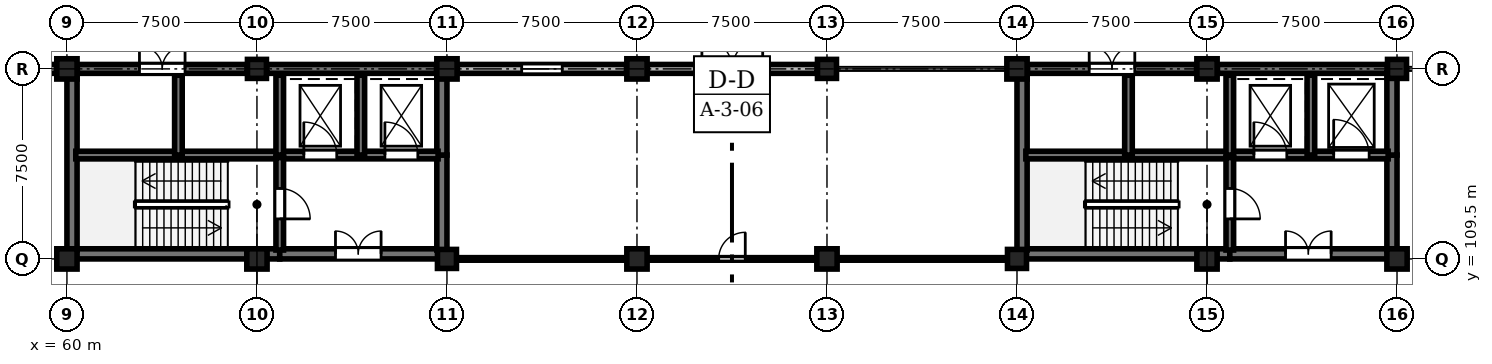
"""IFC4 building model, lengths in metres.
Left out: names, types, materials, properties, quantities, classifications, styles, units other than length and angle.
Written with IfcOpenShell. Run it as: python <this file> out.ifc"""

import sys

from ifc_helpers import new_model, si_unit, direction, frame, frame_2d, origin, origin_2d, place, context, subcontext, project, spatial, rectangle, circle, extrude, element, fill, save


model = new_model("IFC4")
c1 = context("Model", 3, precision=1e-05, world=origin(), true_north=direction((0.0, 1.0)))
c2 = subcontext(c1, "Body", "Model", "MODEL_VIEW")
j1 = project(units=[si_unit("LENGTHUNIT", "METRE"), si_unit("PLANEANGLEUNIT", "RADIAN")], contexts=[c1])
p1 = place(None, origin())
s1 = spatial("IfcSite", under=j1, at=p1, CompositionType="ELEMENT")
p2 = place(p1, origin())
s2 = spatial("IfcBuilding", under=s1, at=p2, CompositionType="ELEMENT")
p3 = place(p2, origin())
s3 = spatial("IfcBuildingStorey", under=s2, at=p3, CompositionType="ELEMENT", Elevation=0.0)
for number, where, z_axis, x_axis in (
    (1, (60.0, 109.5, 0.0), (0.0, 0.0, 1.0), (1.0, 0.0, 0.0)),
    (2, (60.0, 117.0, 0.0), (0.0, 0.0, 1.0), (1.0, 0.0, 0.0)),
    (3, (67.5, 109.5, 0.0), (0.0, 0.0, 1.0), (1.0, 0.0, 0.0)),
):
    element("IfcColumn", number, at=place(p3, frame(where, z_axis=z_axis, x_axis=x_axis)), inside=s3, PredefinedType="COLUMN", context=c2, shape_type="SweptSolid", body=[
        extrude(rectangle(XDim=0.8, YDim=0.8, at=origin_2d()), origin(), (0.0, 0.0, 1.0), 4.8),
    ])
for number, where, z_axis, x_axis in (
    (4, (67.5, 117.0, 0.0), (0.0, 0.0, 1.0), (1.0, 0.0, 0.0)),
    (5, (75.0, 109.5, 0.0), (0.0, 0.0, 1.0), (1.0, 0.0, 0.0)),
):
    element("IfcColumn", number, at=place(p3, frame(where, z_axis=z_axis, x_axis=x_axis)), inside=s3, PredefinedType="COLUMN", context=c2, shape_type="SweptSolid", body=[
        extrude(circle(Radius=0.375, at=origin_2d()), origin(), (0.0, 0.0, 1.0), 4.8),
    ])
for number, where, z_axis, x_axis in (
    (6, (75.0, 117.0, 0.0), (0.0, 0.0, 1.0), (1.0, 0.0, 0.0)),
    (7, (82.5, 109.5, 0.0), (0.0, 0.0, 1.0), (1.0, 0.0, 0.0)),
    (8, (82.5, 117.0, 0.0), (0.0, 0.0, 1.0), (1.0, 0.0, 0.0)),
    (9, (90.0, 109.5, 0.0), (0.0, 0.0, 1.0), (1.0, 0.0, 0.0)),
):
    element("IfcColumn", number, at=place(p3, frame(where, z_axis=z_axis, x_axis=x_axis)), inside=s3, PredefinedType="COLUMN", context=c2, shape_type="SweptSolid", body=[
        extrude(rectangle(XDim=0.8, YDim=0.8, at=origin_2d()), origin(), (0.0, 0.0, 1.0), 4.8),
    ])
for number, where, z_axis, x_axis in (
    (10, (90.0, 117.0, 0.0), (0.0, 0.0, 1.0), (1.0, 0.0, 0.0)),
    (11, (97.5, 109.5, 0.0), (0.0, 0.0, 1.0), (1.0, 0.0, 0.0)),
):
    element("IfcColumn", number, at=place(p3, frame(where, z_axis=z_axis, x_axis=x_axis)), inside=s3, PredefinedType="COLUMN", context=c2, shape_type="SweptSolid", body=[
        extrude(circle(Radius=0.375, at=origin_2d()), origin(), (0.0, 0.0, 1.0), 4.8),
    ])
for number, where, z_axis, x_axis in (
    (12, (97.5, 117.0, 0.0), (0.0, 0.0, 1.0), (1.0, 0.0, 0.0)),
    (13, (105.0, 109.5, 0.0), (0.0, 0.0, 1.0), (1.0, 0.0, 0.0)),
    (14, (105.0, 117.0, 0.0), (0.0, 0.0, 1.0), (1.0, 0.0, 0.0)),
    (15, (112.5, 109.5, 0.0), (0.0, 0.0, 1.0), (1.0, 0.0, 0.0)),
):
    element("IfcColumn", number, at=place(p3, frame(where, z_axis=z_axis, x_axis=x_axis)), inside=s3, PredefinedType="COLUMN", context=c2, shape_type="SweptSolid", body=[
        extrude(rectangle(XDim=0.8, YDim=0.8, at=origin_2d()), origin(), (0.0, 0.0, 1.0), 4.8),
    ])
p4 = place(p3, frame((112.5, 117.0, 0.0), z_axis=(0.0, 0.0, 1.0), x_axis=(1.0, 0.0, 0.0)))
e16 = element("IfcColumn", 16, at=p4, inside=s3, PredefinedType="COLUMN", context=c2, shape_type="SweptSolid", body=[
    extrude(circle(Radius=0.375, at=origin_2d()), origin(), (0.0, 0.0, 1.0), 4.8),
])
p5 = place(p3, frame((52.885, 117.0, 0.0), z_axis=(0.0, 0.0, 1.0), x_axis=(1.0, 0.0, 0.0)))
e17 = element("IfcWall", 17, at=p5, inside=s3, PredefinedType="STANDARD", context=c2, shape_type="SweptSolid", body=[
    extrude(rectangle(XDim=6.705, YDim=0.35, at=frame_2d((3.353, 0.0))), origin(), (0.0, 0.0, 1.0), 3.95),
])
p6 = place(p5, frame((2.752, 0.0, 0.9)))
e18 = element("IfcOpeningElement", 18, at=p6, cuts=e17, PredefinedType="OPENING", context=c2, shape_type="SweptSolid", body=[
    extrude(rectangle(XDim=1.2, YDim=2.1, at=frame_2d((0.6, 1.05))), frame((0.0, 0.185, 0.0), z_axis=(0.0, -1.0, 0.0), x_axis=(1.0, 0.0, 0.0)), (0.0, 0.0, 1.0), 0.37),
])
p7 = place(p3, frame((60.41, 117.0, 0.0), z_axis=(0.0, 0.0, 1.0), x_axis=(1.0, 0.0, 0.0)))
e19 = element("IfcWall", 19, at=p7, inside=s3, PredefinedType="SHEAR", context=c2, shape_type="SweptSolid", body=[
    extrude(rectangle(XDim=6.705, YDim=0.35, at=frame_2d((3.353, 0.0))), origin(), (0.0, 0.0, 1.0), 4.5),
])
p8 = place(p7, frame((2.452, 0.0, 0.0)))
e20 = element("IfcOpeningElement", 20, at=p8, cuts=e19, PredefinedType="OPENING", context=c2, shape_type="SweptSolid", body=[
    extrude(rectangle(XDim=1.8, YDim=2.5, at=frame_2d((0.9, 1.25))), frame((0.0, 0.185, 0.0), z_axis=(0.0, -1.0, 0.0), x_axis=(1.0, 0.0, 0.0)), (0.0, 0.0, 1.0), 0.37),
])
p9 = place(p3, frame((67.885, 117.0, 0.0), z_axis=(0.0, 0.0, 1.0), x_axis=(1.0, 0.0, 0.0)))
e21 = element("IfcWall", 21, at=p9, inside=s3, PredefinedType="SHEAR", context=c2, shape_type="SweptSolid", body=[
    extrude(rectangle(XDim=6.705, YDim=0.35, at=frame_2d((3.353, 0.0))), origin(), (0.0, 0.0, 1.0), 4.5),
])
p10 = place(p3, frame((75.41, 117.0, 0.0), z_axis=(0.0, 0.0, 1.0), x_axis=(1.0, 0.0, 0.0)))
e22 = element("IfcWall", 22, at=p10, inside=s3, PredefinedType="STANDARD", context=c2, shape_type="SweptSolid", body=[
    extrude(rectangle(XDim=6.68, YDim=0.35, at=frame_2d((3.34, 0.0))), origin(), (0.0, 0.0, 1.0), 3.95),
])
p11 = place(p10, frame((2.54, 0.0, 0.9)))
e23 = element("IfcOpeningElement", 23, at=p11, cuts=e22, PredefinedType="OPENING", context=c2, shape_type="SweptSolid", body=[
    extrude(rectangle(XDim=1.6, YDim=1.95, at=frame_2d((0.8, 0.975))), frame((0.0, 0.185, 0.0), z_axis=(0.0, -1.0, 0.0), x_axis=(1.0, 0.0, 0.0)), (0.0, 0.0, 1.0), 0.37),
])
p12 = place(p3, frame((82.91, 117.0, 0.0), z_axis=(0.0, 0.0, 1.0), x_axis=(1.0, 0.0, 0.0)))
e24 = element("IfcWall", 24, at=p12, inside=s3, PredefinedType="STANDARD", context=c2, shape_type="SweptSolid", body=[
    extrude(rectangle(XDim=6.705, YDim=0.35, at=frame_2d((3.353, 0.0))), origin(), (0.0, 0.0, 1.0), 3.95),
])
p13 = place(p12, frame((2.153, 0.0, 0.0)))
e25 = element("IfcOpeningElement", 25, at=p13, cuts=e24, PredefinedType="OPENING", context=c2, shape_type="SweptSolid", body=[
    extrude(rectangle(XDim=2.4, YDim=2.7, at=frame_2d((1.2, 1.35))), frame((0.0, 0.185, 0.0), z_axis=(0.0, -1.0, 0.0), x_axis=(1.0, 0.0, 0.0)), (0.0, 0.0, 1.0), 0.37),
])
p14 = place(p3, frame((97.91, 117.0, 0.0), z_axis=(0.0, 0.0, 1.0), x_axis=(1.0, 0.0, 0.0)))
e26 = element("IfcWall", 26, at=p14, inside=s3, PredefinedType="SHEAR", context=c2, shape_type="SweptSolid", body=[
    extrude(rectangle(XDim=6.68, YDim=0.35, at=frame_2d((3.34, 0.0))), origin(), (0.0, 0.0, 1.0), 4.5),
])
p15 = place(p14, frame((2.44, 0.0, 0.0)))
e27 = element("IfcOpeningElement", 27, at=p15, cuts=e26, PredefinedType="OPENING", context=c2, shape_type="SweptSolid", body=[
    extrude(rectangle(XDim=1.8, YDim=2.5, at=frame_2d((0.9, 1.25))), frame((0.0, 0.185, 0.0), z_axis=(0.0, -1.0, 0.0), x_axis=(1.0, 0.0, 0.0)), (0.0, 0.0, 1.0), 0.37),
])
p16 = place(p3, frame((105.41, 117.0, 0.0), z_axis=(0.0, 0.0, 1.0), x_axis=(1.0, 0.0, 0.0)))
e28 = element("IfcWall", 28, at=p16, inside=s3, PredefinedType="SHEAR", context=c2, shape_type="SweptSolid", body=[
    extrude(rectangle(XDim=6.705, YDim=0.35, at=frame_2d((3.353, 0.0))), origin(), (0.0, 0.0, 1.0), 4.5),
])
p17 = place(p3, frame((60.35, 109.7, 0.0), z_axis=(0.0, 0.0, 1.0), x_axis=(1.0, 0.0, 0.0)))
e29 = element("IfcWall", 29, at=p17, inside=s3, PredefinedType="SHEAR", context=c2, shape_type="SweptSolid", body=[
    extrude(rectangle(XDim=8.05, YDim=0.4, at=frame_2d((4.025, 0.0))), origin(), (0.0, 0.0, 1.0), 4.5),
])
p18 = place(p3, frame((68.4, 109.7, 0.0), z_axis=(0.0, 0.0, 1.0), x_axis=(1.0, 0.0, 0.0)))
e30 = element("IfcWall", 30, at=p18, inside=s3, PredefinedType="SHEAR", context=c2, shape_type="SweptSolid", body=[
    extrude(rectangle(XDim=6.25, YDim=0.4, at=frame_2d((3.125, 0.0))), origin(), (0.0, 0.0, 1.0), 4.5),
])
p19 = place(p18, frame((2.2, 0.0, 0.0)))
e31 = element("IfcOpeningElement", 31, at=p19, cuts=e30, PredefinedType="OPENING", context=c2, shape_type="SweptSolid", body=[
    extrude(rectangle(XDim=1.8, YDim=2.25, at=frame_2d((0.9, 1.125))), frame((0.0, 0.21, 0.0), z_axis=(0.0, -1.0, 0.0), x_axis=(1.0, 0.0, 0.0)), (0.0, 0.0, 1.0), 0.42),
])
p20 = place(p3, frame((60.2, 109.85, 0.0), z_axis=(0.0, 0.0, 1.0), x_axis=(0.0, 1.0, 0.0)))
e32 = element("IfcWall", 32, at=p20, inside=s3, PredefinedType="SHEAR", context=c2, shape_type="SweptSolid", body=[
    extrude(rectangle(XDim=6.8, YDim=0.4, at=frame_2d((3.4, 0.0))), origin(), (0.0, 0.0, 1.0), 4.5),
])
p21 = place(p3, frame((74.8, 109.85, 0.0), z_axis=(0.0, 0.0, 1.0), x_axis=(0.0, 1.0, 0.0)))
e33 = element("IfcWall", 33, at=p21, inside=s3, PredefinedType="SHEAR", context=c2, shape_type="SweptSolid", body=[
    extrude(rectangle(XDim=3.75, YDim=0.4, at=frame_2d((1.875, 0.0))), origin(), (0.0, 0.0, 1.0), 4.5),
])
p22 = place(p3, frame((74.8, 113.6, 0.0), z_axis=(0.0, 0.0, 1.0), x_axis=(0.0, 1.0, 0.0)))
e34 = element("IfcWall", 34, at=p22, inside=s3, PredefinedType="SHEAR", context=c2, shape_type="SweptSolid", body=[
    extrude(rectangle(XDim=3.05, YDim=0.4, at=frame_2d((1.525, 0.0))), origin(), (0.0, 0.0, 1.0), 4.5),
])
p23 = place(p3, frame((60.35, 113.6, 0.0), z_axis=(0.0, 0.0, 1.0), x_axis=(1.0, 0.0, 0.0)))
e35 = element("IfcWall", 35, at=p23, inside=s3, PredefinedType="SHEAR", context=c2, shape_type="SweptSolid", body=[
    extrude(rectangle(XDim=8.05, YDim=0.3, at=frame_2d((4.025, 0.0))), origin(), (0.0, 0.0, 1.0), 4.5),
])
p24 = place(p3, frame((68.4, 113.6, 0.0), z_axis=(0.0, 0.0, 1.0), x_axis=(1.0, 0.0, 0.0)))
e36 = element("IfcWall", 36, at=p24, inside=s3, PredefinedType="SHEAR", context=c2, shape_type="SweptSolid", body=[
    extrude(rectangle(XDim=6.25, YDim=0.3, at=frame_2d((3.125, 0.0))), origin(), (0.0, 0.0, 1.0), 4.5),
])
p25 = place(p24, frame((0.95, 0.0, 0.0)))
e37 = element("IfcOpeningElement", 37, at=p25, cuts=e36, PredefinedType="OPENING", context=c2, shape_type="SweptSolid", body=[
    extrude(rectangle(XDim=1.3, YDim=2.2, at=frame_2d((0.65, 1.1))), frame((0.0, 0.16, 0.0), z_axis=(0.0, -1.0, 0.0), x_axis=(1.0, 0.0, 0.0)), (0.0, 0.0, 1.0), 0.32),
])
p26 = place(p24, frame((4.15, 0.0, 0.0)))
e38 = element("IfcOpeningElement", 38, at=p26, cuts=e36, PredefinedType="OPENING", context=c2, shape_type="SweptSolid", body=[
    extrude(rectangle(XDim=1.3, YDim=2.2, at=frame_2d((0.65, 1.1))), frame((0.0, 0.16, 0.0), z_axis=(0.0, -1.0, 0.0), x_axis=(1.0, 0.0, 0.0)), (0.0, 0.0, 1.0), 0.32),
])
p27 = place(p3, frame((68.4, 113.5, 0.0), z_axis=(0.0, 0.0, 1.0), x_axis=(0.0, -1.0, 0.0)))
e39 = element("IfcWall", 39, at=p27, inside=s3, PredefinedType="SHEAR", context=c2, shape_type="SweptSolid", body=[
    extrude(rectangle(XDim=3.65, YDim=0.3, at=frame_2d((1.825, 0.0))), origin(), (0.0, 0.0, 1.0), 4.5),
])
p28 = place(p27, frame((1.22, 0.0, 0.0)))
e40 = element("IfcOpeningElement", 40, at=p28, cuts=e39, PredefinedType="OPENING", context=c2, shape_type="SweptSolid", body=[
    extrude(rectangle(XDim=1.2, YDim=2.25, at=frame_2d((0.6, 1.125))), frame((0.0, 0.16, 0.0), z_axis=(0.0, -1.0, 0.0), x_axis=(1.0, 0.0, 0.0)), (0.0, 0.0, 1.0), 0.32),
])
for number, where, z_axis, x_axis in (
    (41, (64.4, 113.6, 0.0), (0.0, 0.0, 1.0), (0.0, 1.0, 0.0)),
    (42, (68.4, 113.6, 0.0), (0.0, 0.0, 1.0), (0.0, 1.0, 0.0)),
    (43, (71.6, 113.6, 0.0), (0.0, 0.0, 1.0), (0.0, 1.0, 0.0)),
):
    element("IfcWall", number, at=place(p3, frame(where, z_axis=z_axis, x_axis=x_axis)), inside=s3, PredefinedType="SHEAR", context=c2, shape_type="SweptSolid", body=[
        extrude(rectangle(XDim=3.15, YDim=0.3, at=frame_2d((1.575, 0.0))), origin(), (0.0, 0.0, 1.0), 4.5),
    ])
p29 = place(p3, frame((97.85, 109.7, 0.0), z_axis=(0.0, 0.0, 1.0), x_axis=(1.0, 0.0, 0.0)))
e44 = element("IfcWall", 44, at=p29, inside=s3, PredefinedType="SHEAR", context=c2, shape_type="SweptSolid", body=[
    extrude(rectangle(XDim=8.05, YDim=0.4, at=frame_2d((4.025, 0.0))), origin(), (0.0, 0.0, 1.0), 4.5),
])
p30 = place(p3, frame((105.9, 109.7, 0.0), z_axis=(0.0, 0.0, 1.0), x_axis=(1.0, 0.0, 0.0)))
e45 = element("IfcWall", 45, at=p30, inside=s3, PredefinedType="SHEAR", context=c2, shape_type="SweptSolid", body=[
    extrude(rectangle(XDim=6.25, YDim=0.4, at=frame_2d((3.125, 0.0))), origin(), (0.0, 0.0, 1.0), 4.5),
])
p31 = place(p30, frame((2.2, 0.0, 0.0)))
e46 = element("IfcOpeningElement", 46, at=p31, cuts=e45, PredefinedType="OPENING", context=c2, shape_type="SweptSolid", body=[
    extrude(rectangle(XDim=1.8, YDim=2.25, at=frame_2d((0.9, 1.125))), frame((0.0, 0.21, 0.0), z_axis=(0.0, -1.0, 0.0), x_axis=(1.0, 0.0, 0.0)), (0.0, 0.0, 1.0), 0.42),
])
p32 = place(p3, frame((97.7, 109.85, 0.0), z_axis=(0.0, 0.0, 1.0), x_axis=(0.0, 1.0, 0.0)))
e47 = element("IfcWall", 47, at=p32, inside=s3, PredefinedType="SHEAR", context=c2, shape_type="SweptSolid", body=[
    extrude(rectangle(XDim=6.8, YDim=0.4, at=frame_2d((3.4, 0.0))), origin(), (0.0, 0.0, 1.0), 4.5),
])
p33 = place(p3, frame((112.3, 109.85, 0.0), z_axis=(0.0, 0.0, 1.0), x_axis=(0.0, 1.0, 0.0)))
e48 = element("IfcWall", 48, at=p33, inside=s3, PredefinedType="SHEAR", context=c2, shape_type="SweptSolid", body=[
    extrude(rectangle(XDim=3.75, YDim=0.4, at=frame_2d((1.875, 0.0))), origin(), (0.0, 0.0, 1.0), 4.5),
])
p34 = place(p3, frame((112.3, 113.6, 0.0), z_axis=(0.0, 0.0, 1.0), x_axis=(0.0, 1.0, 0.0)))
e49 = element("IfcWall", 49, at=p34, inside=s3, PredefinedType="SHEAR", context=c2, shape_type="SweptSolid", body=[
    extrude(rectangle(XDim=3.05, YDim=0.4, at=frame_2d((1.525, 0.0))), origin(), (0.0, 0.0, 1.0), 4.5),
])
p35 = place(p3, frame((97.85, 113.6, 0.0), z_axis=(0.0, 0.0, 1.0), x_axis=(1.0, 0.0, 0.0)))
e50 = element("IfcWall", 50, at=p35, inside=s3, PredefinedType="SHEAR", context=c2, shape_type="SweptSolid", body=[
    extrude(rectangle(XDim=8.05, YDim=0.3, at=frame_2d((4.025, 0.0))), origin(), (0.0, 0.0, 1.0), 4.5),
])
p36 = place(p3, frame((105.9, 113.6, 0.0), z_axis=(0.0, 0.0, 1.0), x_axis=(1.0, 0.0, 0.0)))
e51 = element("IfcWall", 51, at=p36, inside=s3, PredefinedType="SHEAR", context=c2, shape_type="SweptSolid", body=[
    extrude(rectangle(XDim=6.25, YDim=0.3, at=frame_2d((3.125, 0.0))), origin(), (0.0, 0.0, 1.0), 4.5),
])
p37 = place(p36, frame((0.95, 0.0, 0.0)))
e52 = element("IfcOpeningElement", 52, at=p37, cuts=e51, PredefinedType="OPENING", context=c2, shape_type="SweptSolid", body=[
    extrude(rectangle(XDim=1.3, YDim=2.2, at=frame_2d((0.65, 1.1))), frame((0.0, 0.16, 0.0), z_axis=(0.0, -1.0, 0.0), x_axis=(1.0, 0.0, 0.0)), (0.0, 0.0, 1.0), 0.32),
])
p38 = place(p36, frame((4.1, 0.0, 0.0)))
e53 = element("IfcOpeningElement", 53, at=p38, cuts=e51, PredefinedType="OPENING", context=c2, shape_type="SweptSolid", body=[
    extrude(rectangle(XDim=1.4, YDim=2.25, at=frame_2d((0.7, 1.125))), frame((0.0, 0.16, 0.0), z_axis=(0.0, -1.0, 0.0), x_axis=(1.0, 0.0, 0.0)), (0.0, 0.0, 1.0), 0.32),
])
p39 = place(p3, frame((105.9, 113.5, 0.0), z_axis=(0.0, 0.0, 1.0), x_axis=(0.0, -1.0, 0.0)))
e54 = element("IfcWall", 54, at=p39, inside=s3, PredefinedType="SHEAR", context=c2, shape_type="SweptSolid", body=[
    extrude(rectangle(XDim=3.65, YDim=0.3, at=frame_2d((1.825, 0.0))), origin(), (0.0, 0.0, 1.0), 4.5),
])
p40 = place(p39, frame((1.22, 0.0, 0.0)))
e55 = element("IfcOpeningElement", 55, at=p40, cuts=e54, PredefinedType="OPENING", context=c2, shape_type="SweptSolid", body=[
    extrude(rectangle(XDim=1.2, YDim=2.25, at=frame_2d((0.6, 1.125))), frame((0.0, 0.16, 0.0), z_axis=(0.0, -1.0, 0.0), x_axis=(1.0, 0.0, 0.0)), (0.0, 0.0, 1.0), 0.32),
])
for number, where, z_axis, x_axis in (
    (56, (101.9, 113.6, 0.0), (0.0, 0.0, 1.0), (0.0, 1.0, 0.0)),
    (57, (105.9, 113.6, 0.0), (0.0, 0.0, 1.0), (0.0, 1.0, 0.0)),
    (58, (109.1, 113.6, 0.0), (0.0, 0.0, 1.0), (0.0, 1.0, 0.0)),
):
    element("IfcWall", number, at=place(p3, frame(where, z_axis=z_axis, x_axis=x_axis)), inside=s3, PredefinedType="SHEAR", context=c2, shape_type="SweptSolid", body=[
        extrude(rectangle(XDim=3.15, YDim=0.3, at=frame_2d((1.575, 0.0))), origin(), (0.0, 0.0, 1.0), 4.5),
    ])
p41 = place(p3, frame((75.3, 109.5, 0.0), z_axis=(0.0, 0.0, 1.0), x_axis=(1.0, 0.0, 0.0)))
e59 = element("IfcWall", 59, at=p41, inside=s3, PredefinedType="PARTITIONING", context=c2, shape_type="SweptSolid", body=[
    extrude(rectangle(XDim=21.9, YDim=0.1, at=frame_2d((10.95, 0.0))), origin(), (0.0, 0.0, 1.0), 3.835),
])
p42 = place(p41, frame((10.425, 0.0, 0.0)))
e60 = element("IfcOpeningElement", 60, at=p42, cuts=e59, PredefinedType="OPENING", context=c2, shape_type="SweptSolid", body=[
    extrude(rectangle(XDim=1.05, YDim=2.2, at=frame_2d((0.525, 1.1))), frame((0.0, 0.06, 0.0), z_axis=(0.0, -1.0, 0.0), x_axis=(1.0, 0.0, 0.0)), (0.0, 0.0, 1.0), 0.12),
])
p43 = place(p8, origin())
e61 = element("IfcDoor", 61, at=p43, inside=s3, OperationType="DOUBLE_DOOR_SINGLE_SWING", PredefinedType="DOOR", context=c2, shape_type="SweptSolid", body=[
    extrude(rectangle(XDim=1.8, YDim=2.5, at=frame_2d((0.9, 1.25))), frame((0.0, 0.025, 0.0), z_axis=(0.0, -1.0, 0.0), x_axis=(1.0, 0.0, 0.0)), (0.0, 0.0, 1.0), 0.05),
])
fill(e20, e61)
p44 = place(p11, origin())
e62 = element("IfcWindow", 62, at=p44, inside=s3, PartitioningType="SINGLE_PANEL", PredefinedType="WINDOW", context=c2, shape_type="SweptSolid", body=[
    extrude(rectangle(XDim=1.6, YDim=1.95, at=frame_2d((0.8, 0.975))), frame((0.0, 0.03, 0.0), z_axis=(0.0, -1.0, 0.0), x_axis=(1.0, 0.0, 0.0)), (0.0, 0.0, 1.0), 0.06),
])
fill(e23, e62)
p45 = place(p13, origin())
e63 = element("IfcDoor", 63, at=p45, inside=s3, OperationType="DOUBLE_DOOR_SINGLE_SWING", PredefinedType="DOOR", context=c2, shape_type="SweptSolid", body=[
    extrude(rectangle(XDim=2.4, YDim=2.7, at=frame_2d((1.2, 1.35))), frame((0.0, 0.025, 0.0), z_axis=(0.0, -1.0, 0.0), x_axis=(1.0, 0.0, 0.0)), (0.0, 0.0, 1.0), 0.05),
])
fill(e25, e63)
p46 = place(p15, origin())
e64 = element("IfcDoor", 64, at=p46, inside=s3, OperationType="DOUBLE_DOOR_SINGLE_SWING", PredefinedType="DOOR", context=c2, shape_type="SweptSolid", body=[
    extrude(rectangle(XDim=1.8, YDim=2.5, at=frame_2d((0.9, 1.25))), frame((0.0, 0.025, 0.0), z_axis=(0.0, -1.0, 0.0), x_axis=(1.0, 0.0, 0.0)), (0.0, 0.0, 1.0), 0.05),
])
fill(e27, e64)
p47 = place(p19, origin())
e65 = element("IfcDoor", 65, at=p47, inside=s3, OperationType="DOUBLE_DOOR_SINGLE_SWING", PredefinedType="DOOR", context=c2, shape_type="SweptSolid", body=[
    extrude(rectangle(XDim=1.8, YDim=2.25, at=frame_2d((0.9, 1.125))), frame((0.0, 0.025, 0.0), z_axis=(0.0, -1.0, 0.0), x_axis=(1.0, 0.0, 0.0)), (0.0, 0.0, 1.0), 0.05),
])
fill(e31, e65)
p48 = place(p25, origin())
e66 = element("IfcDoor", 66, at=p48, inside=s3, OperationType="DOUBLE_DOOR_SLIDING", PredefinedType="DOOR", context=c2, shape_type="SweptSolid", body=[
    extrude(rectangle(XDim=1.3, YDim=2.2, at=frame_2d((0.65, 1.1))), frame((0.0, 0.025, 0.0), z_axis=(0.0, -1.0, 0.0), x_axis=(1.0, 0.0, 0.0)), (0.0, 0.0, 1.0), 0.05),
])
fill(e37, e66)
p49 = place(p26, origin())
e67 = element("IfcDoor", 67, at=p49, inside=s3, OperationType="DOUBLE_DOOR_SLIDING", PredefinedType="DOOR", context=c2, shape_type="SweptSolid", body=[
    extrude(rectangle(XDim=1.3, YDim=2.2, at=frame_2d((0.65, 1.1))), frame((0.0, 0.025, 0.0), z_axis=(0.0, -1.0, 0.0), x_axis=(1.0, 0.0, 0.0)), (0.0, 0.0, 1.0), 0.05),
])
fill(e38, e67)
p50 = place(p28, origin())
e68 = element("IfcDoor", 68, at=p50, inside=s3, OperationType="SINGLE_SWING_RIGHT", PredefinedType="DOOR", context=c2, shape_type="SweptSolid", body=[
    extrude(rectangle(XDim=1.2, YDim=2.25, at=frame_2d((0.6, 1.125))), frame((0.0, 0.025, 0.0), z_axis=(0.0, -1.0, 0.0), x_axis=(1.0, 0.0, 0.0)), (0.0, 0.0, 1.0), 0.05),
])
fill(e40, e68)
p51 = place(p31, origin())
e69 = element("IfcDoor", 69, at=p51, inside=s3, OperationType="DOUBLE_DOOR_SINGLE_SWING", PredefinedType="DOOR", context=c2, shape_type="SweptSolid", body=[
    extrude(rectangle(XDim=1.8, YDim=2.25, at=frame_2d((0.9, 1.125))), frame((0.0, 0.025, 0.0), z_axis=(0.0, -1.0, 0.0), x_axis=(1.0, 0.0, 0.0)), (0.0, 0.0, 1.0), 0.05),
])
fill(e46, e69)
p52 = place(p37, origin())
e70 = element("IfcDoor", 70, at=p52, inside=s3, OperationType="DOUBLE_DOOR_SLIDING", PredefinedType="DOOR", context=c2, shape_type="SweptSolid", body=[
    extrude(rectangle(XDim=1.3, YDim=2.2, at=frame_2d((0.65, 1.1))), frame((0.0, 0.025, 0.0), z_axis=(0.0, -1.0, 0.0), x_axis=(1.0, 0.0, 0.0)), (0.0, 0.0, 1.0), 0.05),
])
fill(e52, e70)
p53 = place(p38, origin())
e71 = element("IfcDoor", 71, at=p53, inside=s3, OperationType="DOUBLE_DOOR_SLIDING", PredefinedType="DOOR", context=c2, shape_type="SweptSolid", body=[
    extrude(rectangle(XDim=1.4, YDim=2.25, at=frame_2d((0.7, 1.125))), frame((0.0, 0.025, 0.0), z_axis=(0.0, -1.0, 0.0), x_axis=(1.0, 0.0, 0.0)), (0.0, 0.0, 1.0), 0.05),
])
fill(e53, e71)
p54 = place(p40, origin())
e72 = element("IfcDoor", 72, at=p54, inside=s3, OperationType="SINGLE_SWING_RIGHT", PredefinedType="DOOR", context=c2, shape_type="SweptSolid", body=[
    extrude(rectangle(XDim=1.2, YDim=2.25, at=frame_2d((0.6, 1.125))), frame((0.0, 0.025, 0.0), z_axis=(0.0, -1.0, 0.0), x_axis=(1.0, 0.0, 0.0)), (0.0, 0.0, 1.0), 0.05),
])
fill(e55, e72)
p55 = place(p42, origin())
e73 = element("IfcDoor", 73, at=p55, inside=s3, OperationType="SINGLE_SWING_RIGHT", PredefinedType="DOOR", context=c2, shape_type="SweptSolid", body=[
    extrude(rectangle(XDim=1.05, YDim=2.2, at=frame_2d((0.525, 1.1))), frame((0.0, 0.025, 0.0), z_axis=(0.0, -1.0, 0.0), x_axis=(1.0, 0.0, 0.0)), (0.0, 0.0, 1.0), 0.05),
])
fill(e60, e73)
save(model, sys.argv[1])
